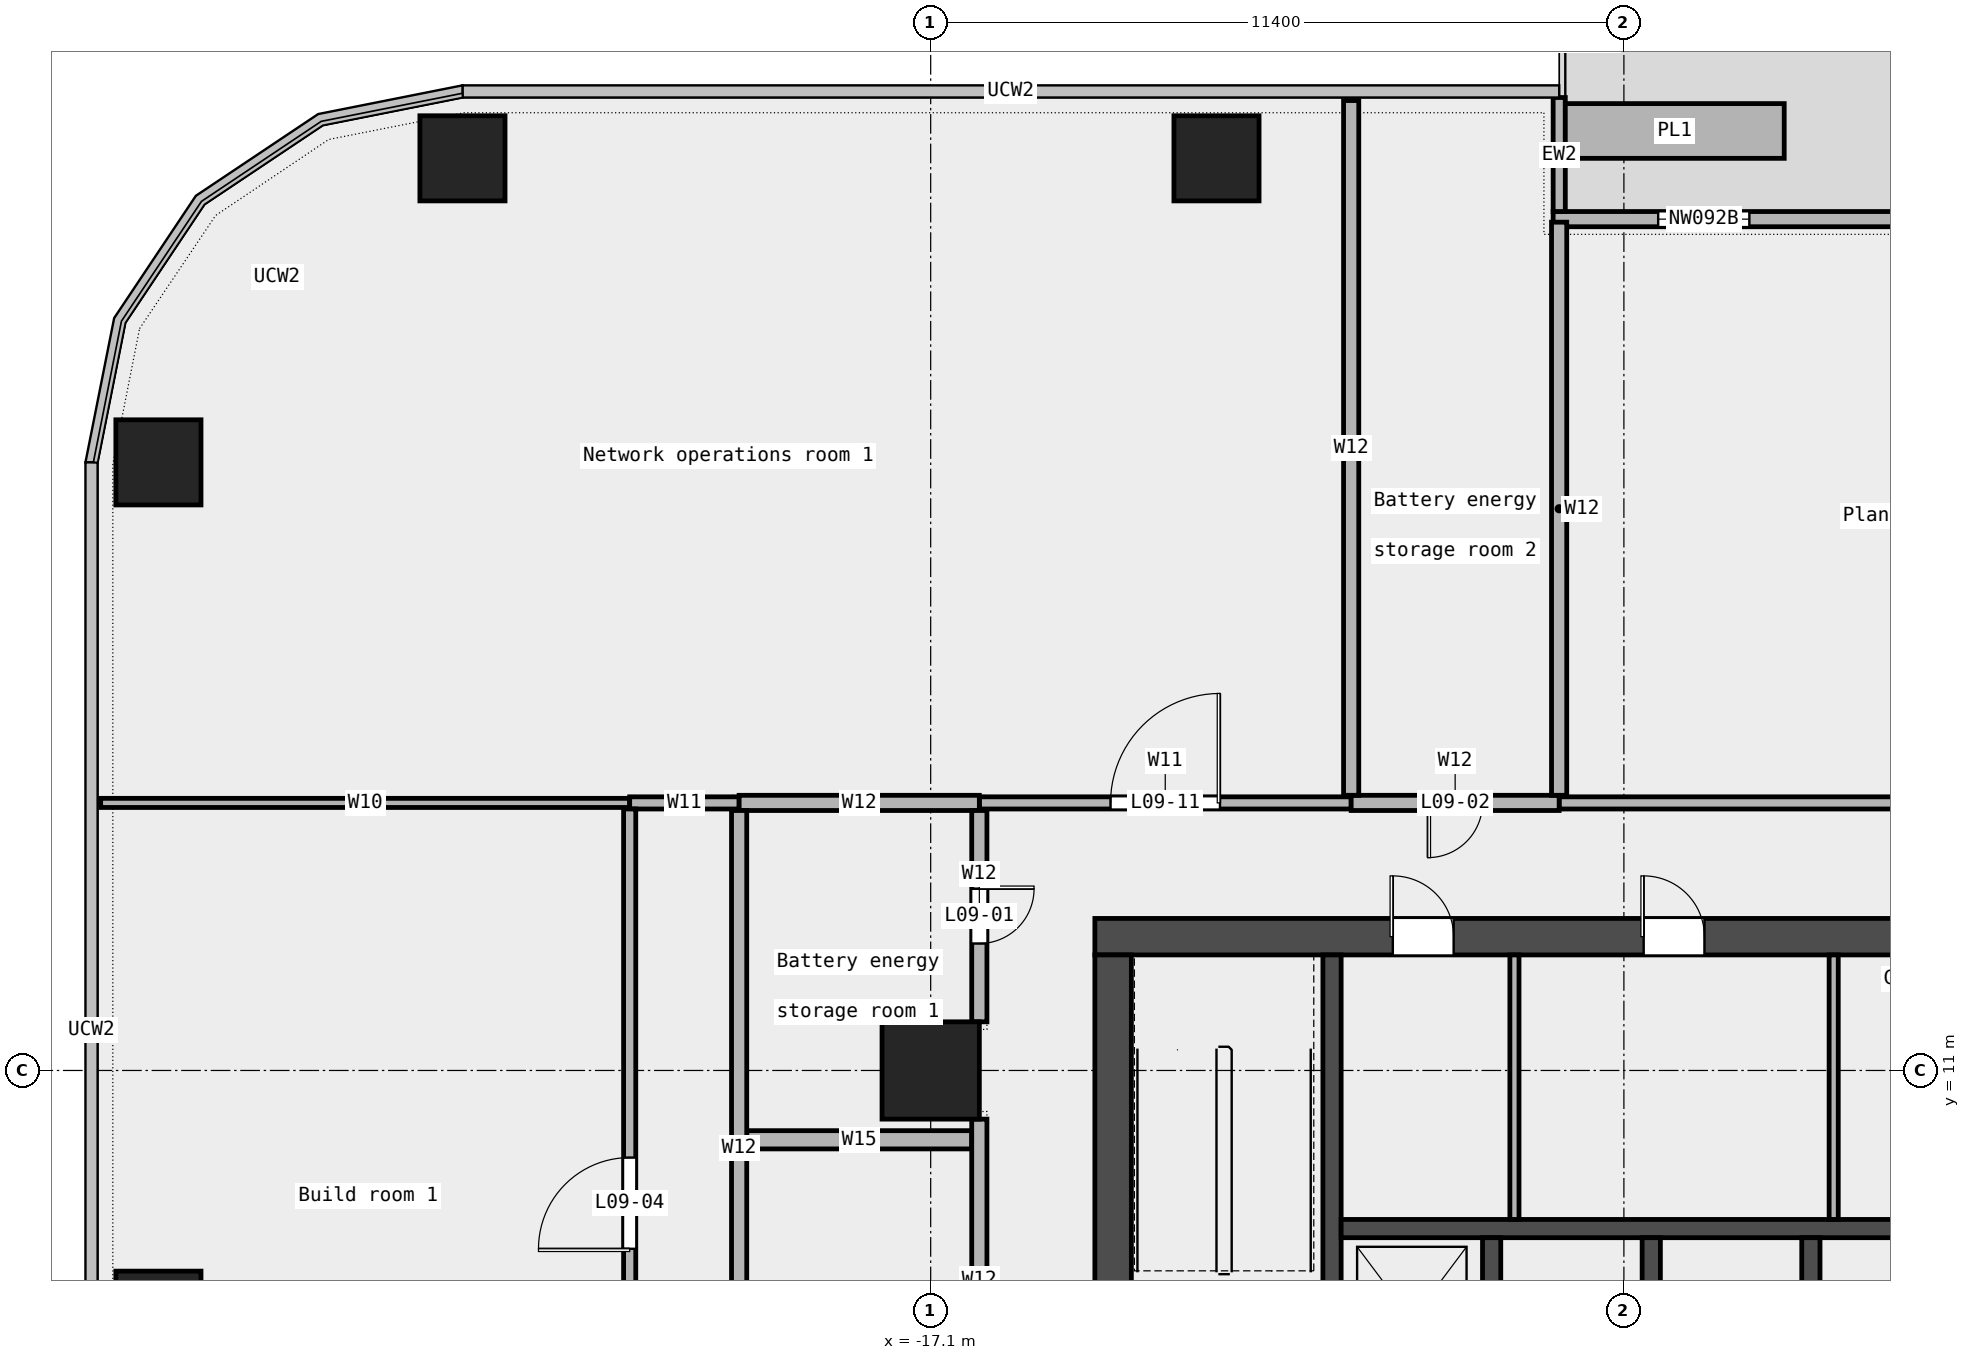
"""IFC4 building model, lengths in metres.
Left out: names, types, materials, properties, quantities, classifications, styles, units other than length and angle.
Written with IfcOpenShell. Run it as: python <this file> out.ifc"""

import sys

from ifc_helpers import new_model, si_unit, direction, frame, frame_2d, origin, origin_2d, place, context, subcontext, project, spatial, rectangle, extrude, element, fill, save


model = new_model("IFC4")
c1 = context("Model", 3, precision=1e-05, world=origin(), true_north=direction((0.0, 1.0)))
c2 = subcontext(c1, "Body", "Model", "MODEL_VIEW")
j1 = project(units=[si_unit("LENGTHUNIT", "METRE"), si_unit("PLANEANGLEUNIT", "RADIAN")], contexts=[c1])
p1 = place(None, origin())
s1 = spatial("IfcSite", under=j1, at=p1, CompositionType="ELEMENT")
p2 = place(p1, origin())
s2 = spatial("IfcBuilding", under=s1, at=p2, CompositionType="ELEMENT")
p3 = place(p2, frame((0.0, 0.0, 50.2)))
s3 = spatial("IfcBuildingStorey", under=s2, at=p3, CompositionType="ELEMENT", Elevation=50.2)
for number, where, z_axis, x_axis in (
    (1, (-12.4, 26.0, 0.0), (0.0, 0.0, 1.0), (1.0, 0.0, 0.0)),
    (2, (-24.8, 26.0, 0.0), (0.0, 0.0, 1.0), (1.0, 0.0, 0.0)),
    (3, (-29.8, 21.0, 0.0), (0.0, 0.0, 1.0), (1.0, 0.0, 0.0)),
    (4, (-29.8, 7.0, 0.0), (0.0, 0.0, 1.0), (1.0, 0.0, 0.0)),
):
    element("IfcColumn", number, at=place(p3, frame(where, z_axis=z_axis, x_axis=x_axis)), inside=s3, PredefinedType="COLUMN", context=c2, shape_type="SweptSolid", body=[
        extrude(rectangle(XDim=1.4, YDim=1.4, at=origin_2d()), origin(), (0.0, 0.0, 1.0), 4.35),
    ])
p4 = place(p3, frame((-17.1, 11.0, 0.0), z_axis=(0.0, 0.0, 1.0), x_axis=(1.0, 0.0, 0.0)))
e5 = element("IfcColumn", 5, at=p4, inside=s3, PredefinedType="COLUMN", context=c2, shape_type="SweptSolid", body=[
    extrude(rectangle(XDim=1.6, YDim=1.6, at=origin_2d()), origin(), (0.0, 0.0, 1.0), 4.35),
])
p5 = place(p3, frame((6.864, 25.0, 0.0), z_axis=(0.0, 0.0, 1.0), x_axis=(-1.0, 0.0, 0.0)))
e6 = element("IfcWall", 6, at=p5, inside=s3, PredefinedType="STANDARD", context=c2, shape_type="SweptSolid", body=[
    extrude(rectangle(XDim=13.727, YDim=0.25, at=frame_2d((6.864, 0.0))), origin(), (0.0, 0.0, 1.0), 4.35),
])
p6 = place(p5, frame((1.75, 0.0, 0.45)))
e7 = element("IfcOpeningElement", 7, at=p6, cuts=e6, PredefinedType="OPENING", context=c2, shape_type="SweptSolid", body=[
    extrude(rectangle(XDim=1.5, YDim=3.0, at=frame_2d((0.75, 1.5))), frame((0.0, 0.137, 0.0), z_axis=(0.0, -1.0, 0.0), x_axis=(1.0, 0.0, 0.0)), (0.0, 0.0, 1.0), 0.274),
])
p7 = place(p5, frame((4.0, 0.0, 0.0)))
e8 = element("IfcOpeningElement", 8, at=p7, cuts=e6, PredefinedType="OPENING", context=c2, shape_type="SweptSolid", body=[
    extrude(rectangle(XDim=1.8, YDim=2.4, at=frame_2d((0.9, 1.2))), frame((0.0, 0.137, 0.0), z_axis=(0.0, -1.0, 0.0), x_axis=(1.0, 0.0, 0.0)), (0.0, 0.0, 1.0), 0.274),
])
p8 = place(p5, frame((10.5, 0.0, 0.45)))
e9 = element("IfcOpeningElement", 9, at=p8, cuts=e6, PredefinedType="OPENING", context=c2, shape_type="SweptSolid", body=[
    extrude(rectangle(XDim=1.5, YDim=3.0, at=frame_2d((0.75, 1.5))), frame((0.0, 0.137, 0.0), z_axis=(0.0, -1.0, 0.0), x_axis=(1.0, 0.0, 0.0)), (0.0, 0.0, 1.0), 0.274),
])
p9 = place(p3, frame((-6.764, 27.0, 0.0), z_axis=(0.0, 0.0, 1.0), x_axis=(0.0, -1.0, 0.0)))
e10 = element("IfcWall", 10, at=p9, inside=s3, PredefinedType="STANDARD", context=c2, shape_type="SweptSolid", body=[
    extrude(rectangle(XDim=1.875, YDim=0.2, at=frame_2d((0.938, 0.0))), origin(), (0.0, 0.0, 1.0), 4.35),
])
p10 = place(p3, frame((-3.064, 26.45, 0.0), z_axis=(0.0, 0.0, 1.0), x_axis=(-1.0, 0.0, 0.0)))
e11 = element("IfcWall", 11, at=p10, inside=s3, PredefinedType="STANDARD", context=c2, shape_type="SweptSolid", body=[
    extrude(rectangle(XDim=3.6, YDim=0.9, at=frame_2d((1.8, 0.0))), origin(), (0.0, 0.0, 1.0), 0.7),
])
p11 = place(p3, frame((-20.125, 9.86, 0.0), z_axis=(0.0, 0.0, 1.0), x_axis=(1.0, 0.0, 0.0)))
e12 = element("IfcWall", 12, at=p11, inside=s3, PredefinedType="PARTITIONING", context=c2, shape_type="SweptSolid", body=[
    extrude(rectangle(XDim=3.7, YDim=0.3, at=frame_2d((1.85, 0.0))), origin(), (0.0, 0.0, 1.0), 4.35),
])
p12 = place(p3, frame((-30.75, 15.4, 0.0), z_axis=(0.0, 0.0, 1.0), x_axis=(1.0, 0.0, 0.0)))
e13 = element("IfcWall", 13, at=p12, inside=s3, PredefinedType="PARTITIONING", context=c2, shape_type="SweptSolid", body=[
    extrude(rectangle(XDim=8.7, YDim=0.15, at=frame_2d((4.35, 0.0))), origin(), (0.0, 0.0, 1.0), 4.35),
])
p13 = place(p3, frame((-22.05, 15.4, 0.0), z_axis=(0.0, 0.0, 1.0), x_axis=(1.0, 0.0, 0.0)))
e14 = element("IfcWall", 14, at=p13, inside=s3, PredefinedType="PARTITIONING", context=c2, shape_type="SweptSolid", body=[
    extrude(rectangle(XDim=1.8, YDim=0.2, at=frame_2d((0.9, 0.0))), origin(), (0.0, 0.0, 1.0), 4.35),
])
p14 = place(p3, frame((-16.3, 15.4, 0.0), z_axis=(0.0, 0.0, 1.0), x_axis=(1.0, 0.0, 0.0)))
e15 = element("IfcWall", 15, at=p14, inside=s3, PredefinedType="PARTITIONING", context=c2, shape_type="SweptSolid", body=[
    extrude(rectangle(XDim=6.115, YDim=0.2, at=frame_2d((3.058, 0.0))), origin(), (0.0, 0.0, 1.0), 4.35),
])
p15 = place(p14, frame((2.157, 0.0, 0.0)))
e16 = element("IfcOpeningElement", 16, at=p15, cuts=e15, PredefinedType="OPENING", context=c2, shape_type="SweptSolid", body=[
    extrude(rectangle(XDim=1.8, YDim=2.1, at=frame_2d((0.9, 1.05))), frame((0.0, 0.112, 0.0), z_axis=(0.0, -1.0, 0.0), x_axis=(1.0, 0.0, 0.0)), (0.0, 0.0, 1.0), 0.224),
])
p16 = place(p3, frame((-6.765, 15.4, 0.0), z_axis=(0.0, 0.0, 1.0), x_axis=(1.0, 0.0, 0.0)))
e17 = element("IfcWall", 17, at=p16, inside=s3, PredefinedType="PARTITIONING", context=c2, shape_type="SweptSolid", body=[
    extrude(rectangle(XDim=13.53, YDim=0.2, at=frame_2d((6.765, 0.0))), origin(), (0.0, 0.0, 1.0), 4.35),
])
p17 = place(p16, frame((6.015, 0.0, 0.0)))
e18 = element("IfcOpeningElement", 18, at=p17, cuts=e17, PredefinedType="OPENING", context=c2, shape_type="SweptSolid", body=[
    extrude(rectangle(XDim=1.5, YDim=2.1, at=frame_2d((0.75, 1.05))), frame((0.0, 0.112, 0.0), z_axis=(0.0, -1.0, 0.0), x_axis=(1.0, 0.0, 0.0)), (0.0, 0.0, 1.0), 0.224),
])
p18 = place(p3, frame((-20.25, 15.4, 0.0), z_axis=(0.0, 0.0, 1.0), x_axis=(1.0, 0.0, 0.0)))
e19 = element("IfcWall", 19, at=p18, inside=s3, PredefinedType="PARTITIONING", context=c2, shape_type="SweptSolid", body=[
    extrude(rectangle(XDim=3.95, YDim=0.25, at=frame_2d((1.975, 0.0))), origin(), (0.0, 0.0, 1.0), 4.35),
])
p19 = place(p3, frame((-10.185, 15.4, 0.0), z_axis=(0.0, 0.0, 1.0), x_axis=(1.0, 0.0, 0.0)))
e20 = element("IfcWall", 20, at=p19, inside=s3, PredefinedType="PARTITIONING", context=c2, shape_type="SweptSolid", body=[
    extrude(rectangle(XDim=3.42, YDim=0.25, at=frame_2d((1.71, 0.0))), origin(), (0.0, 0.0, 1.0), 4.35),
])
p20 = place(p19, frame((1.26, 0.0, 0.0)))
e21 = element("IfcOpeningElement", 21, at=p20, cuts=e20, PredefinedType="OPENING", context=c2, shape_type="SweptSolid", body=[
    extrude(rectangle(XDim=0.9, YDim=2.1, at=frame_2d((0.45, 1.05))), frame((0.0, 0.137, 0.0), z_axis=(0.0, -1.0, 0.0), x_axis=(1.0, 0.0, 0.0)), (0.0, 0.0, 1.0), 0.274),
])
p21 = place(p3, frame((-22.05, -9.0, 0.0), z_axis=(0.0, 0.0, 1.0), x_axis=(0.0, 1.0, 0.0)))
e22 = element("IfcWall", 22, at=p21, inside=s3, PredefinedType="PARTITIONING", context=c2, shape_type="SweptSolid", body=[
    extrude(rectangle(XDim=24.3, YDim=0.2, at=frame_2d((12.15, 0.0))), origin(), (0.0, 0.0, 1.0), 4.35),
])
p22 = place(p21, frame((17.067, 0.0, 0.0)))
e23 = element("IfcOpeningElement", 23, at=p22, cuts=e22, PredefinedType="OPENING", context=c2, shape_type="SweptSolid", body=[
    extrude(rectangle(XDim=1.5, YDim=2.1, at=frame_2d((0.75, 1.05))), frame((0.0, 0.112, 0.0), z_axis=(0.0, -1.0, 0.0), x_axis=(1.0, 0.0, 0.0)), (0.0, 0.0, 1.0), 0.224),
])
p23 = place(p21, frame((4.768, 0.0, 0.0)))
e24 = element("IfcOpeningElement", 24, at=p23, cuts=e22, PredefinedType="OPENING", context=c2, shape_type="SweptSolid", body=[
    extrude(rectangle(XDim=1.8, YDim=2.1, at=frame_2d((0.9, 1.05))), frame((0.0, 0.112, 0.0), z_axis=(0.0, -1.0, 0.0), x_axis=(1.0, 0.0, 0.0)), (0.0, 0.0, 1.0), 0.224),
])
p24 = place(p3, frame((-20.25, 4.175, 0.0), z_axis=(0.0, 0.0, 1.0), x_axis=(0.0, 1.0, 0.0)))
e25 = element("IfcWall", 25, at=p24, inside=s3, PredefinedType="PARTITIONING", context=c2, shape_type="SweptSolid", body=[
    extrude(rectangle(XDim=11.1, YDim=0.25, at=frame_2d((5.55, 0.0))), origin(), (0.0, 0.0, 1.0), 4.35),
])
p25 = place(p3, frame((-16.3, 4.175, 0.0), z_axis=(0.0, 0.0, 1.0), x_axis=(0.0, 1.0, 0.0)))
e26 = element("IfcWall", 26, at=p25, inside=s3, PredefinedType="PARTITIONING", context=c2, shape_type="SweptSolid", body=[
    extrude(rectangle(XDim=6.025, YDim=0.25, at=frame_2d((3.012, 0.0))), origin(), (0.0, 0.0, 1.0), 4.35),
])
p26 = place(p25, frame((2.393, 0.0, 0.0)))
e27 = element("IfcOpeningElement", 27, at=p26, cuts=e26, PredefinedType="OPENING", context=c2, shape_type="SweptSolid", body=[
    extrude(rectangle(XDim=0.9, YDim=2.1, at=frame_2d((0.45, 1.05))), frame((0.0, 0.137, 0.0), z_axis=(0.0, -1.0, 0.0), x_axis=(1.0, 0.0, 0.0)), (0.0, 0.0, 1.0), 0.274),
])
p27 = place(p3, frame((-16.3, 11.8, 0.0), z_axis=(0.0, 0.0, 1.0), x_axis=(0.0, 1.0, 0.0)))
e28 = element("IfcWall", 28, at=p27, inside=s3, PredefinedType="PARTITIONING", context=c2, shape_type="SweptSolid", body=[
    extrude(rectangle(XDim=3.475, YDim=0.25, at=frame_2d((1.737, 0.0))), origin(), (0.0, 0.0, 1.0), 4.35),
])
p28 = place(p27, frame((1.288, 0.0, 0.0)))
e29 = element("IfcOpeningElement", 29, at=p28, cuts=e28, PredefinedType="OPENING", context=c2, shape_type="SweptSolid", body=[
    extrude(rectangle(XDim=0.9, YDim=2.1, at=frame_2d((0.45, 1.05))), frame((0.0, 0.137, 0.0), z_axis=(0.0, -1.0, 0.0), x_axis=(1.0, 0.0, 0.0)), (0.0, 0.0, 1.0), 0.274),
])
p29 = place(p3, frame((-10.185, 15.525, 0.0), z_axis=(0.0, 0.0, 1.0), x_axis=(0.0, 1.0, 0.0)))
e30 = element("IfcWall", 30, at=p29, inside=s3, PredefinedType="PARTITIONING", context=c2, shape_type="SweptSolid", body=[
    extrude(rectangle(XDim=11.425, YDim=0.25, at=frame_2d((5.712, 0.0))), origin(), (0.0, 0.0, 1.0), 4.35),
])
p30 = place(p3, frame((-6.765, 15.525, 0.0), z_axis=(0.0, 0.0, 1.0), x_axis=(0.0, 1.0, 0.0)))
e31 = element("IfcWall", 31, at=p30, inside=s3, PredefinedType="PARTITIONING", context=c2, shape_type="SweptSolid", body=[
    extrude(rectangle(XDim=9.425, YDim=0.25, at=frame_2d((4.712, 0.0))), origin(), (0.0, 0.0, 1.0), 4.35),
])
p31 = place(p3, frame((-14.4, 13.2, 0.0), z_axis=(0.0, 0.0, 1.0), x_axis=(1.0, 0.0, 0.0)))
e32 = element("IfcWall", 32, at=p31, inside=s3, PredefinedType="SHEAR", context=c2, shape_type="SweptSolid", body=[
    extrude(rectangle(XDim=28.8, YDim=0.6, at=frame_2d((14.4, 0.0))), origin(), (0.0, 0.0, 1.0), 4.5),
])
p32 = place(p31, frame((4.9, 0.0, 0.0)))
e33 = element("IfcOpeningElement", 33, at=p32, cuts=e32, PredefinedType="OPENING", context=c2, shape_type="SweptSolid", body=[
    extrude(rectangle(XDim=1.0, YDim=2.1, at=frame_2d((0.5, 1.05))), frame((0.0, 0.312, 0.0), z_axis=(0.0, -1.0, 0.0), x_axis=(1.0, 0.0, 0.0)), (0.0, 0.0, 1.0), 0.624),
])
p33 = place(p31, frame((9.025, 0.0, 0.0)))
e34 = element("IfcOpeningElement", 34, at=p33, cuts=e32, PredefinedType="OPENING", context=c2, shape_type="SweptSolid", body=[
    extrude(rectangle(XDim=1.0, YDim=2.1, at=frame_2d((0.5, 1.05))), frame((0.0, 0.312, 0.0), z_axis=(0.0, -1.0, 0.0), x_axis=(1.0, 0.0, 0.0)), (0.0, 0.0, 1.0), 0.624),
])
p34 = place(p31, frame((13.337, 0.0, 0.0)))
e35 = element("IfcOpeningElement", 35, at=p34, cuts=e32, PredefinedType="OPENING", context=c2, shape_type="SweptSolid", body=[
    extrude(rectangle(XDim=1.0, YDim=2.1, at=frame_2d((0.5, 1.05))), frame((0.0, 0.312, 0.0), z_axis=(0.0, -1.0, 0.0), x_axis=(1.0, 0.0, 0.0)), (0.0, 0.0, 1.0), 0.624),
])
p35 = place(p31, frame((17.087, 0.0, 0.0)))
e36 = element("IfcOpeningElement", 36, at=p35, cuts=e32, PredefinedType="OPENING", context=c2, shape_type="SweptSolid", body=[
    extrude(rectangle(XDim=1.0, YDim=2.1, at=frame_2d((0.5, 1.05))), frame((0.0, 0.312, 0.0), z_axis=(0.0, -1.0, 0.0), x_axis=(1.0, 0.0, 0.0)), (0.0, 0.0, 1.0), 0.624),
])
p36 = place(p31, frame((21.775, 0.0, 0.0)))
e37 = element("IfcOpeningElement", 37, at=p36, cuts=e32, PredefinedType="OPENING", context=c2, shape_type="SweptSolid", body=[
    extrude(rectangle(XDim=1.0, YDim=2.1, at=frame_2d((0.5, 1.05))), frame((0.0, 0.312, 0.0), z_axis=(0.0, -1.0, 0.0), x_axis=(1.0, 0.0, 0.0)), (0.0, 0.0, 1.0), 0.624),
])
p37 = place(p3, frame((-14.1, -6.6, 0.0), z_axis=(0.0, 0.0, 1.0), x_axis=(0.0, 1.0, 0.0)))
e38 = element("IfcWall", 38, at=p37, inside=s3, PredefinedType="SHEAR", context=c2, shape_type="SweptSolid", body=[
    extrude(rectangle(XDim=19.5, YDim=0.6, at=frame_2d((9.75, 0.0))), origin(), (0.0, 0.0, 1.0), 4.5),
])
p38 = place(p37, frame((9.3, 0.0, 0.0)))
e39 = element("IfcOpeningElement", 39, at=p38, cuts=e38, PredefinedType="OPENING", context=c2, shape_type="SweptSolid", body=[
    extrude(rectangle(XDim=1.8, YDim=2.1, at=frame_2d((0.9, 1.05))), frame((0.0, 0.312, 0.0), z_axis=(0.0, -1.0, 0.0), x_axis=(1.0, 0.0, 0.0)), (0.0, 0.0, 1.0), 0.624),
])
p39 = place(p3, frame((-10.5, 5.25, 0.0), z_axis=(0.0, 0.0, 1.0), x_axis=(0.0, 1.0, 0.0)))
e40 = element("IfcWall", 40, at=p39, inside=s3, PredefinedType="SHEAR", context=c2, shape_type="SweptSolid", body=[
    extrude(rectangle(XDim=7.65, YDim=0.3, at=frame_2d((3.825, 0.0))), origin(), (0.0, 0.0, 1.0), 4.5),
])
p40 = place(p3, frame((-10.35, 8.4, 0.0), z_axis=(0.0, 0.0, 1.0), x_axis=(1.0, 0.0, 0.0)))
e41 = element("IfcWall", 41, at=p40, inside=s3, PredefinedType="SOLIDWALL", context=c2, shape_type="SweptSolid", body=[
    extrude(rectangle(XDim=20.7, YDim=0.3, at=frame_2d((10.35, 0.0))), origin(), (0.0, 0.0, 1.0), 4.5),
])
for number, where, z_axis, x_axis in (
    (42, (-7.875, 5.55, 0.0), (0.0, 0.0, 1.0), (0.0, 1.0, 0.0)),
    (43, (-5.25, 5.55, 0.0), (0.0, 0.0, 1.0), (0.0, 1.0, 0.0)),
    (44, (-2.625, 5.55, 0.0), (0.0, 0.0, 1.0), (0.0, 1.0, 0.0)),
):
    element("IfcWall", number, at=place(p3, frame(where, z_axis=z_axis, x_axis=x_axis)), inside=s3, PredefinedType="SOLIDWALL", context=c2, shape_type="SweptSolid", body=[
        extrude(rectangle(XDim=2.7, YDim=0.3, at=frame_2d((1.35, 0.0))), origin(), (0.0, 0.0, 1.0), 4.5),
    ])
for number, where, z_axis, x_axis in (
    (45, (-7.5, 8.55, 0.0), (0.0, 0.0, 1.0), (0.0, 1.0, 0.0)),
    (46, (-2.25, 8.55, 0.0), (0.0, 0.0, 1.0), (0.0, 1.0, 0.0)),
):
    element("IfcWall", number, at=place(p3, frame(where, z_axis=z_axis, x_axis=x_axis)), inside=s3, PredefinedType="PARTITIONING", context=c2, shape_type="SweptSolid", body=[
        extrude(rectangle(XDim=4.35, YDim=0.15, at=frame_2d((2.175, 0.0))), origin(), (0.0, 0.0, 1.0), 4.5),
    ])
p41 = place(p8, origin())
e47 = element("IfcWindow", 47, at=p41, inside=s3, PartitioningType="SINGLE_PANEL", PredefinedType="WINDOW", context=c2, shape_type="SweptSolid", body=[
    extrude(rectangle(XDim=1.5, YDim=3.0, at=frame_2d((0.75, 1.5))), frame((0.0, 0.03, 0.0), z_axis=(0.0, -1.0, 0.0), x_axis=(1.0, 0.0, 0.0)), (0.0, 0.0, 1.0), 0.06),
])
fill(e9, e47)
p42 = place(p28, origin())
e48 = element("IfcDoor", 48, at=p42, inside=s3, OperationType="SINGLE_SWING_LEFT", PredefinedType="DOOR", context=c2, shape_type="SweptSolid", body=[
    extrude(rectangle(XDim=0.9, YDim=2.1, at=frame_2d((0.45, 1.05))), frame((0.0, 0.025, 0.0), z_axis=(0.0, -1.0, 0.0), x_axis=(1.0, 0.0, 0.0)), (0.0, 0.0, 1.0), 0.05),
])
fill(e29, e48)
p43 = place(p20, origin())
e49 = element("IfcDoor", 49, at=p43, inside=s3, OperationType="SINGLE_SWING_RIGHT", PredefinedType="DOOR", context=c2, shape_type="SweptSolid", body=[
    extrude(rectangle(XDim=0.9, YDim=2.1, at=frame_2d((0.45, 1.05))), frame((0.0, 0.025, 0.0), z_axis=(0.0, -1.0, 0.0), x_axis=(1.0, 0.0, 0.0)), (0.0, 0.0, 1.0), 0.05),
])
fill(e21, e49)
p44 = place(p22, origin())
e50 = element("IfcDoor", 50, at=p44, inside=s3, OperationType="DOUBLE_DOOR_SINGLE_SWING", PredefinedType="DOOR", context=c2, shape_type="SweptSolid", body=[
    extrude(rectangle(XDim=1.5, YDim=2.1, at=frame_2d((0.75, 1.05))), frame((0.0, 0.025, 0.0), z_axis=(0.0, -1.0, 0.0), x_axis=(1.0, 0.0, 0.0)), (0.0, 0.0, 1.0), 0.05),
])
fill(e23, e50)
p45 = place(p15, origin())
e51 = element("IfcDoor", 51, at=p45, inside=s3, OperationType="DOUBLE_DOOR_SINGLE_SWING", PredefinedType="DOOR", context=c2, shape_type="SweptSolid", body=[
    extrude(rectangle(XDim=1.8, YDim=2.1, at=frame_2d((0.9, 1.05))), frame((0.0, 0.025, 0.0), z_axis=(0.0, -1.0, 0.0), x_axis=(1.0, 0.0, 0.0)), (0.0, 0.0, 1.0), 0.05),
])
fill(e16, e51)
p46 = place(p32, origin())
e52 = element("IfcDoor", 52, at=p46, inside=s3, OperationType="SINGLE_SWING_LEFT", PredefinedType="DOOR", context=c2, shape_type="SweptSolid", body=[
    extrude(rectangle(XDim=1.0, YDim=2.1, at=frame_2d((0.5, 1.05))), frame((0.0, 0.025, 0.0), z_axis=(0.0, -1.0, 0.0), x_axis=(1.0, 0.0, 0.0)), (0.0, 0.0, 1.0), 0.05),
])
fill(e33, e52)
p47 = place(p33, origin())
e53 = element("IfcDoor", 53, at=p47, inside=s3, OperationType="SINGLE_SWING_LEFT", PredefinedType="DOOR", context=c2, shape_type="SweptSolid", body=[
    extrude(rectangle(XDim=1.0, YDim=2.1, at=frame_2d((0.5, 1.05))), frame((0.0, 0.025, 0.0), z_axis=(0.0, -1.0, 0.0), x_axis=(1.0, 0.0, 0.0)), (0.0, 0.0, 1.0), 0.05),
])
fill(e34, e53)
save(model, sys.argv[1])
